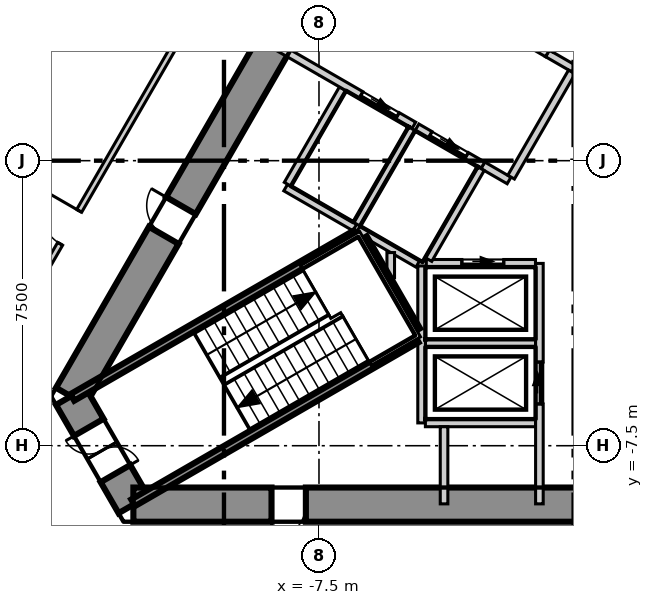
"""IFC4 building model, lengths in metres.
Left out: names, types, materials, properties, quantities, classifications, styles, units other than length and angle.
Written with IfcOpenShell. Run it as: python <this file> out.ifc"""

import sys

from ifc_helpers import new_model, si_unit, direction, frame, frame_2d, origin, place, context, subcontext, project, spatial, polyline, rectangle, outline, extrude, element, fill, save


model = new_model("IFC4")
c1 = context("Model", 3, precision=1e-05, world=origin(), true_north=direction((0.0, 1.0)))
c2 = subcontext(c1, "Body", "Model", "MODEL_VIEW")
j1 = project(units=[si_unit("LENGTHUNIT", "METRE"), si_unit("PLANEANGLEUNIT", "RADIAN")], contexts=[c1])
p1 = place(None, origin())
s1 = spatial("IfcSite", under=j1, at=p1, CompositionType="ELEMENT")
p2 = place(p1, origin())
s2 = spatial("IfcBuilding", under=s1, at=p2, CompositionType="ELEMENT")
p3 = place(p2, frame((0.0, 0.0, 59.3)))
s3 = spatial("IfcBuildingStorey", under=s2, at=p3, CompositionType="ELEMENT", Elevation=59.3)
p4 = place(p3, frame((-1.645, 15.25, -0.3), z_axis=(0.0, 0.0, 1.0), x_axis=(-0.500026485275, -0.866010111964, 0.0)))
e1 = element("IfcWall", 1, at=p4, inside=s3, PredefinedType="SHEAR", context=c2, shape_type="SweptSolid", body=[
    extrude(outline(polyline([(-0.26, -0.45), (1.685, -0.45), (3.63, -0.45), (5.576, -0.45), (7.521, -0.45), (9.466, -0.449), (11.411, -0.449), (13.357, -0.449), (15.302, -0.449), (17.247, -0.449), (19.192, -0.449), (21.138, -0.449), (23.083, -0.449), (25.028, -0.449), (24.509, 0.45), (22.644, 0.45), (20.778, 0.45), (18.913, 0.45), (17.048, 0.45), (15.182, 0.449), (13.317, 0.449), (11.452, 0.449), (9.587, 0.449), (7.721, 0.449), (5.856, 0.449), (3.991, 0.449), (2.125, 0.449), (0.26, 0.449), (-0.26, -0.45)])), origin(), (0.0, 0.0, 1.0), 4.0),
])
p5 = place(p4, frame((11.834, 0.0, 0.3)))
e2 = element("IfcOpeningElement", 2, at=p5, cuts=e1, PredefinedType="OPENING", context=c2, shape_type="SweptSolid", body=[
    extrude(rectangle(XDim=1.1, YDim=2.1, at=frame_2d((0.55, 1.05))), frame((0.0, 0.46, 0.0), z_axis=(0.0, -1.0, 0.0), x_axis=(1.0, 0.0, 0.0)), (0.0, 0.0, 1.0), 0.92),
])
p6 = place(p4, frame((18.976, 0.0, 0.3)))
e3 = element("IfcOpeningElement", 3, at=p6, cuts=e1, PredefinedType="OPENING", context=c2, shape_type="SweptSolid", body=[
    extrude(rectangle(XDim=0.9, YDim=2.1, at=frame_2d((0.45, 1.05))), frame((0.0, 0.46, 0.0), z_axis=(0.0, -1.0, 0.0), x_axis=(1.0, 0.0, 0.0)), (0.0, 0.0, 1.0), 0.92),
])
p7 = place(p4, frame((4.892, 0.0, 0.3)))
e4 = element("IfcOpeningElement", 4, at=p7, cuts=e1, PredefinedType="OPENING", context=c2, shape_type="SweptSolid", body=[
    extrude(rectangle(XDim=0.9, YDim=2.1, at=frame_2d((0.45, 1.05))), frame((0.0, 0.46, 0.0), z_axis=(0.0, -1.0, 0.0), x_axis=(1.0, 0.0, 0.0)), (0.0, 0.0, 1.0), 0.92),
])
p8 = place(p3, frame((-14.03, -6.2, -0.3), z_axis=(0.0, 0.0, 1.0), x_axis=(0.500111984565, -0.865960739811, 0.0)))
e5 = element("IfcWall", 5, at=p8, inside=s3, PredefinedType="SHEAR", context=c2, shape_type="SweptSolid", body=[
    extrude(outline(polyline([(-0.26, -0.449), (1.646, -0.449), (3.551, -0.45), (3.032, 0.45), (1.646, 0.45), (0.26, 0.45), (-0.26, -0.449)])), origin(), (0.0, 0.0, 1.0), 4.0),
])
p9 = place(p8, frame((0.946, 0.0, 0.3)))
e6 = element("IfcOpeningElement", 6, at=p9, cuts=e5, PredefinedType="OPENING", context=c2, shape_type="SweptSolid", body=[
    extrude(rectangle(XDim=1.4, YDim=2.1, at=frame_2d((0.7, 1.05))), frame((0.0, 0.46, 0.0), z_axis=(0.0, -1.0, 0.0), x_axis=(1.0, 0.0, 0.0)), (0.0, 0.0, 1.0), 0.92),
])
p10 = place(p3, frame((-12.384, -9.05, -0.3), z_axis=(0.0, 0.0, 1.0), x_axis=(1.0, 0.0, 0.0)))
e7 = element("IfcWall", 7, at=p10, inside=s3, PredefinedType="SHEAR", context=c2, shape_type="SweptSolid", body=[
    extrude(outline(polyline([(-0.26, -0.45), (1.685, -0.45), (3.63, -0.45), (5.576, -0.45), (7.521, -0.45), (9.466, -0.45), (11.411, -0.45), (13.357, -0.45), (15.302, -0.45), (17.247, -0.45), (19.192, -0.45), (21.138, -0.45), (23.083, -0.45), (25.028, -0.45), (24.508, 0.45), (22.643, 0.45), (20.778, 0.45), (18.912, 0.45), (17.047, 0.45), (15.182, 0.45), (13.317, 0.45), (11.451, 0.45), (9.586, 0.45), (7.721, 0.45), (5.856, 0.45), (3.99, 0.45), (2.125, 0.45), (0.26, 0.45), (-0.26, -0.45)])), origin(), (0.0, 0.0, 1.0), 4.0),
])
p11 = place(p10, frame((3.637, 0.0, 0.3)))
e8 = element("IfcOpeningElement", 8, at=p11, cuts=e7, PredefinedType="OPENING", context=c2, shape_type="SweptSolid", body=[
    extrude(rectangle(XDim=0.9, YDim=2.1, at=frame_2d((0.45, 1.05))), frame((0.0, 0.46, 0.0), z_axis=(0.0, -1.0, 0.0), x_axis=(1.0, 0.0, 0.0)), (0.0, 0.0, 1.0), 0.92),
])
p12 = place(p10, frame((16.022, 0.0, 0.3)))
e9 = element("IfcOpeningElement", 9, at=p12, cuts=e7, PredefinedType="OPENING", context=c2, shape_type="SweptSolid", body=[
    extrude(rectangle(XDim=0.9, YDim=2.1, at=frame_2d((0.45, 1.05))), frame((0.0, 0.46, 0.0), z_axis=(0.0, -1.0, 0.0), x_axis=(1.0, 0.0, 0.0)), (0.0, 0.0, 1.0), 0.92),
])
p13 = place(p3, frame((-3.371, 37.591, 0.0), z_axis=(0.0, 0.0, 1.0), x_axis=(-0.500006313899, -0.866021758423, 0.0)))
e10 = element("IfcWall", 10, at=p13, inside=s3, PredefinedType="ELEMENTEDWALL", context=c2, shape_type="SweptSolid", body=[
    extrude(rectangle(XDim=61.719, YDim=0.2, at=frame_2d((30.859, 0.0))), origin(), (0.0, 0.0, 1.0), 3.7),
])
p14 = place(p13, frame((2.198, 0.0, 0.9)))
e11 = element("IfcOpeningElement", 11, at=p14, cuts=e10, PredefinedType="OPENING", context=c2, shape_type="SweptSolid", body=[
    extrude(rectangle(XDim=5.6, YDim=2.5, at=frame_2d((2.8, 1.25))), frame((0.0, 0.11, 0.0), z_axis=(0.0, -1.0, 0.0), x_axis=(1.0, 0.0, 0.0)), (0.0, 0.0, 1.0), 0.22),
])
p15 = place(p13, frame((9.59, 0.0, 0.9)))
e12 = element("IfcOpeningElement", 12, at=p15, cuts=e10, PredefinedType="OPENING", context=c2, shape_type="SweptSolid", body=[
    extrude(rectangle(XDim=5.6, YDim=2.5, at=frame_2d((2.8, 1.25))), frame((0.0, 0.11, 0.0), z_axis=(0.0, -1.0, 0.0), x_axis=(1.0, 0.0, 0.0)), (0.0, 0.0, 1.0), 0.22),
])
p16 = place(p13, frame((16.982, 0.0, 0.9)))
e13 = element("IfcOpeningElement", 13, at=p16, cuts=e10, PredefinedType="OPENING", context=c2, shape_type="SweptSolid", body=[
    extrude(rectangle(XDim=5.6, YDim=2.5, at=frame_2d((2.8, 1.25))), frame((0.0, 0.11, 0.0), z_axis=(0.0, -1.0, 0.0), x_axis=(1.0, 0.0, 0.0)), (0.0, 0.0, 1.0), 0.22),
])
p17 = place(p13, frame((24.373, 0.0, 0.9)))
e14 = element("IfcOpeningElement", 14, at=p17, cuts=e10, PredefinedType="OPENING", context=c2, shape_type="SweptSolid", body=[
    extrude(rectangle(XDim=5.6, YDim=2.5, at=frame_2d((2.8, 1.25))), frame((0.0, 0.11, 0.0), z_axis=(0.0, -1.0, 0.0), x_axis=(1.0, 0.0, 0.0)), (0.0, 0.0, 1.0), 0.22),
])
p18 = place(p13, frame((31.765, 0.0, 0.9)))
e15 = element("IfcOpeningElement", 15, at=p18, cuts=e10, PredefinedType="OPENING", context=c2, shape_type="SweptSolid", body=[
    extrude(rectangle(XDim=5.6, YDim=2.5, at=frame_2d((2.8, 1.25))), frame((0.0, 0.11, 0.0), z_axis=(0.0, -1.0, 0.0), x_axis=(1.0, 0.0, 0.0)), (0.0, 0.0, 1.0), 0.22),
])
p19 = place(p13, frame((39.157, 0.0, 0.9)))
e16 = element("IfcOpeningElement", 16, at=p19, cuts=e10, PredefinedType="OPENING", context=c2, shape_type="SweptSolid", body=[
    extrude(rectangle(XDim=5.6, YDim=2.5, at=frame_2d((2.8, 1.25))), frame((0.0, 0.11, 0.0), z_axis=(0.0, -1.0, 0.0), x_axis=(1.0, 0.0, 0.0)), (0.0, 0.0, 1.0), 0.22),
])
p20 = place(p13, frame((46.548, 0.0, 0.9)))
e17 = element("IfcOpeningElement", 17, at=p20, cuts=e10, PredefinedType="OPENING", context=c2, shape_type="SweptSolid", body=[
    extrude(rectangle(XDim=5.6, YDim=2.5, at=frame_2d((2.8, 1.25))), frame((0.0, 0.11, 0.0), z_axis=(0.0, -1.0, 0.0), x_axis=(1.0, 0.0, 0.0)), (0.0, 0.0, 1.0), 0.22),
])
p21 = place(p13, frame((53.94, 0.0, 0.9)))
e18 = element("IfcOpeningElement", 18, at=p21, cuts=e10, PredefinedType="OPENING", context=c2, shape_type="SweptSolid", body=[
    extrude(rectangle(XDim=5.6, YDim=2.5, at=frame_2d((2.8, 1.25))), frame((0.0, 0.11, 0.0), z_axis=(0.0, -1.0, 0.0), x_axis=(1.0, 0.0, 0.0)), (0.0, 0.0, 1.0), 0.22),
])
p22 = place(p3, frame((-19.497, -11.17, 0.0), z_axis=(0.0, 0.0, 1.0), x_axis=(0.499998854553, 0.866026065108, 0.0)))
e19 = element("IfcWall", 19, at=p22, inside=s3, PredefinedType="PARTITIONING", context=c2, shape_type="SweptSolid", body=[
    extrude(rectangle(XDim=38.994, YDim=0.15, at=frame_2d((19.497, 0.0))), origin(), (0.0, 0.0, 1.0), 3.7),
])
p23 = place(p22, frame((36.044, 0.0, 0.0)))
e20 = element("IfcOpeningElement", 20, at=p23, cuts=e19, PredefinedType="OPENING", context=c2, shape_type="SweptSolid", body=[
    extrude(rectangle(XDim=1.1, YDim=2.1, at=frame_2d((0.55, 1.05))), frame((0.0, 0.085, 0.0), z_axis=(0.0, -1.0, 0.0), x_axis=(1.0, 0.0, 0.0)), (0.0, 0.0, 1.0), 0.17),
])
p24 = place(p22, frame((21.855, 0.0, 0.0)))
e21 = element("IfcOpeningElement", 21, at=p24, cuts=e19, PredefinedType="OPENING", context=c2, shape_type="SweptSolid", body=[
    extrude(rectangle(XDim=1.1, YDim=2.1, at=frame_2d((0.55, 1.05))), frame((0.0, 0.085, 0.0), z_axis=(0.0, -1.0, 0.0), x_axis=(1.0, 0.0, 0.0)), (0.0, 0.0, 1.0), 0.17),
])
p25 = place(p22, frame((32.155, 0.0, 0.0)))
e22 = element("IfcOpeningElement", 22, at=p25, cuts=e19, PredefinedType="OPENING", context=c2, shape_type="SweptSolid", body=[
    extrude(rectangle(XDim=0.9, YDim=2.1, at=frame_2d((0.45, 1.05))), frame((0.0, 0.085, 0.0), z_axis=(0.0, -1.0, 0.0), x_axis=(1.0, 0.0, 0.0)), (0.0, 0.0, 1.0), 0.17),
])
p26 = place(p22, frame((28.955, 0.0, 0.0)))
e23 = element("IfcOpeningElement", 23, at=p26, cuts=e19, PredefinedType="OPENING", context=c2, shape_type="SweptSolid", body=[
    extrude(rectangle(XDim=0.9, YDim=2.1, at=frame_2d((0.45, 1.05))), frame((0.0, 0.085, 0.0), z_axis=(0.0, -1.0, 0.0), x_axis=(1.0, 0.0, 0.0)), (0.0, 0.0, 1.0), 0.17),
])
p27 = place(p22, frame((26.055, 0.0, 0.0)))
e24 = element("IfcOpeningElement", 24, at=p27, cuts=e19, PredefinedType="OPENING", context=c2, shape_type="SweptSolid", body=[
    extrude(rectangle(XDim=1.0, YDim=2.1, at=frame_2d((0.5, 1.05))), frame((0.0, 0.085, 0.0), z_axis=(0.0, -1.0, 0.0), x_axis=(1.0, 0.0, 0.0)), (0.0, 0.0, 1.0), 0.17),
])
p28 = place(p22, frame((10.373, 0.0, 0.0)))
e25 = element("IfcOpeningElement", 25, at=p28, cuts=e19, PredefinedType="OPENING", context=c2, shape_type="SweptSolid", body=[
    extrude(rectangle(XDim=1.0, YDim=2.1, at=frame_2d((0.5, 1.05))), frame((0.0, 0.085, 0.0), z_axis=(0.0, -1.0, 0.0), x_axis=(1.0, 0.0, 0.0)), (0.0, 0.0, 1.0), 0.17),
])
p29 = place(p22, frame((17.773, 0.0, 0.0)))
e26 = element("IfcOpeningElement", 26, at=p29, cuts=e19, PredefinedType="OPENING", context=c2, shape_type="SweptSolid", body=[
    extrude(rectangle(XDim=0.9, YDim=2.1, at=frame_2d((0.45, 1.05))), frame((0.0, 0.085, 0.0), z_axis=(0.0, -1.0, 0.0), x_axis=(1.0, 0.0, 0.0)), (0.0, 0.0, 1.0), 0.17),
])
p30 = place(p22, frame((1.689, 0.0, 0.0)))
e27 = element("IfcOpeningElement", 27, at=p30, cuts=e19, PredefinedType="OPENING", context=c2, shape_type="SweptSolid", body=[
    extrude(rectangle(XDim=1.1, YDim=2.1, at=frame_2d((0.55, 1.05))), frame((0.0, 0.085, 0.0), z_axis=(0.0, -1.0, 0.0), x_axis=(1.0, 0.0, 0.0)), (0.0, 0.0, 1.0), 0.17),
])
p31 = place(p3, frame((-8.376, -0.707, 0.0), z_axis=(0.0, 0.0, 1.0), x_axis=(0.866067520717, -0.499927044236, 0.0)))
e28 = element("IfcWall", 28, at=p31, inside=s3, PredefinedType="SOLIDWALL", context=c2, shape_type="SweptSolid", body=[
    extrude(rectangle(XDim=2.1, YDim=0.2, at=frame_2d((1.05, 0.0))), origin(), (0.0, 0.0, 1.0), 3.7),
])
p32 = place(p3, frame((-8.326, -0.62, 0.0), z_axis=(0.0, 0.0, 1.0), x_axis=(0.500023687443, 0.866011727401, 0.0)))
e29 = element("IfcWall", 29, at=p32, inside=s3, PredefinedType="SOLIDWALL", context=c2, shape_type="SweptSolid", body=[
    extrude(rectangle(XDim=2.9, YDim=0.2, at=frame_2d((1.45, 0.0))), origin(), (0.0, 0.0, 1.0), 3.7),
])
p33 = place(p3, frame((-4.7, -4.8, 0.0), z_axis=(0.0, 0.0, 1.0), x_axis=(1.0, 0.0, 0.0)))
e30 = element("IfcWall", 30, at=p33, inside=s3, PredefinedType="SOLIDWALL", context=c2, shape_type="SweptSolid", body=[
    extrude(rectangle(XDim=2.9, YDim=0.2, at=frame_2d((1.45, 0.0))), origin(), (0.0, 0.0, 1.0), 3.7),
])
p34 = place(p3, frame((-4.8, -6.9, 0.0), z_axis=(0.0, 0.0, 1.0), x_axis=(0.0, 1.0, 0.0)))
e31 = element("IfcWall", 31, at=p34, inside=s3, PredefinedType="SOLIDWALL", context=c2, shape_type="SweptSolid", body=[
    extrude(rectangle(XDim=4.131, YDim=0.2, at=frame_2d((2.065, 0.0))), origin(), (0.0, 0.0, 1.0), 3.7),
])
p35 = place(p3, frame((-4.7, -6.9, 0.0), z_axis=(0.0, 0.0, 1.0), x_axis=(1.0, 0.0, 0.0)))
e32 = element("IfcWall", 32, at=p35, inside=s3, PredefinedType="SOLIDWALL", context=c2, shape_type="SweptSolid", body=[
    extrude(rectangle(XDim=2.9, YDim=0.2, at=frame_2d((1.45, 0.0))), origin(), (0.0, 0.0, 1.0), 3.7),
])
p36 = place(p3, frame((-1.7, -9.03, 0.0), z_axis=(0.0, 0.0, 1.0), x_axis=(0.0, 1.0, 0.0)))
e33 = element("IfcWall", 33, at=p36, inside=s3, PredefinedType="SOLIDWALL", context=c2, shape_type="SweptSolid", body=[
    extrude(rectangle(XDim=6.327, YDim=0.2, at=frame_2d((3.164, 0.0))), origin(), (0.0, 0.0, 1.0), 3.7),
])
p37 = place(p36, frame((2.63, 0.0, 0.0)))
e34 = element("IfcOpeningElement", 34, at=p37, cuts=e33, PredefinedType="OPENING", context=c2, shape_type="SweptSolid", body=[
    extrude(rectangle(XDim=1.1, YDim=2.1, at=frame_2d((0.55, 1.05))), frame((0.0, 0.11, 0.0), z_axis=(0.0, -1.0, 0.0), x_axis=(1.0, 0.0, 0.0)), (0.0, 0.0, 1.0), 0.22),
])
p38 = place(p3, frame((-4.676, -2.7, 0.0), z_axis=(0.0, 0.0, 1.0), x_axis=(1.0, 0.0, 0.0)))
e35 = element("IfcWall", 35, at=p38, inside=s3, PredefinedType="SOLIDWALL", context=c2, shape_type="SweptSolid", body=[
    extrude(rectangle(XDim=2.873, YDim=0.2, at=frame_2d((1.437, 0.0))), origin(), (0.0, 0.0, 1.0), 3.7),
])
p39 = place(p38, frame((0.937, 0.0, 0.0)))
e36 = element("IfcOpeningElement", 36, at=p39, cuts=e35, PredefinedType="OPENING", context=c2, shape_type="SweptSolid", body=[
    extrude(rectangle(XDim=1.1, YDim=2.1, at=frame_2d((0.55, 1.05))), frame((0.0, 0.11, 0.0), z_axis=(0.0, -1.0, 0.0), x_axis=(1.0, 0.0, 0.0)), (0.0, 0.0, 1.0), 0.22),
])
p40 = place(p3, frame((-8.67, 3.043, 0.0), z_axis=(0.0, 0.0, 1.0), x_axis=(0.866029956157, -0.499992114976, 0.0)))
e37 = element("IfcWall", 37, at=p40, inside=s3, PredefinedType="SOLIDWALL", context=c2, shape_type="SweptSolid", body=[
    extrude(rectangle(XDim=4.232, YDim=0.2, at=frame_2d((2.116, 0.0))), origin(), (0.0, 0.0, 1.0), 3.7),
])
p41 = place(p40, frame((2.63, 0.0, 0.0)))
e38 = element("IfcOpeningElement", 38, at=p41, cuts=e37, PredefinedType="OPENING", context=c2, shape_type="SweptSolid", body=[
    extrude(rectangle(XDim=1.1, YDim=2.1, at=frame_2d((0.55, 1.05))), frame((0.0, 0.11, 0.0), z_axis=(0.0, -1.0, 0.0), x_axis=(1.0, 0.0, 0.0)), (0.0, 0.0, 1.0), 0.22),
])
p42 = place(p3, frame((-3.188, -0.122, 0.0), z_axis=(0.0, 0.0, 1.0), x_axis=(0.865705793592, -0.50055317294, 0.0)))
e39 = element("IfcWall", 39, at=p42, inside=s3, PredefinedType="SOLIDWALL", context=c2, shape_type="SweptSolid", body=[
    extrude(rectangle(XDim=0.797, YDim=0.2, at=frame_2d((0.398, 0.0))), origin(), (0.0, 0.0, 1.0), 3.7),
])
p43 = place(p3, frame((-1.488, 2.822, 0.0), z_axis=(0.0, 0.0, 1.0), x_axis=(0.866236612152, -0.499633997809, 0.0)))
e40 = element("IfcWall", 40, at=p43, inside=s3, PredefinedType="SOLIDWALL", context=c2, shape_type="SweptSolid", body=[
    extrude(rectangle(XDim=0.796, YDim=0.2, at=frame_2d((0.398, 0.0))), origin(), (0.0, 0.0, 1.0), 3.7),
])
p44 = place(p3, frame((-2.444, -0.433, 0.0), z_axis=(0.0, 0.0, 1.0), x_axis=(0.500035624827, 0.866004834804, 0.0)))
e41 = element("IfcWall", 41, at=p44, inside=s3, PredefinedType="SOLIDWALL", context=c2, shape_type="SweptSolid", body=[
    extrude(rectangle(XDim=3.194, YDim=0.2, at=frame_2d((1.597, 0.0))), origin(), (0.0, 0.0, 1.0), 3.7),
])
p45 = place(p3, frame((-6.507, -1.67, 0.0), z_axis=(0.0, 0.0, 1.0), x_axis=(0.50012328804, 0.865954211699, 0.0)))
e42 = element("IfcWall", 42, at=p45, inside=s3, PredefinedType="SOLIDWALL", context=c2, shape_type="SweptSolid", body=[
    extrude(rectangle(XDim=2.9, YDim=0.2, at=frame_2d((1.45, 0.0))), origin(), (0.0, 0.0, 1.0), 3.7),
])
p46 = place(p3, frame((-6.47, -1.807, 0.0), z_axis=(0.0, 0.0, 1.0), x_axis=(0.865883195159, -0.500246231712, 0.0)))
e43 = element("IfcWall", 43, at=p46, inside=s3, PredefinedType="SOLIDWALL", context=c2, shape_type="SweptSolid", body=[
    extrude(rectangle(XDim=1.815, YDim=0.2, at=frame_2d((0.908, 0.0))), origin(), (0.0, 0.0, 1.0), 3.7),
])
p47 = place(p3, frame((-4.922, 0.879, 0.0), z_axis=(0.0, 0.0, 1.0), x_axis=(0.866073918653, -0.499915960366, 0.0)))
e44 = element("IfcWall", 44, at=p47, inside=s3, PredefinedType="SOLIDWALL", context=c2, shape_type="SweptSolid", body=[
    extrude(rectangle(XDim=2.002, YDim=0.2, at=frame_2d((1.001, 0.0))), origin(), (0.0, 0.0, 1.0), 3.7),
])
p48 = place(p47, frame((0.402, 0.0, 0.0)))
e45 = element("IfcOpeningElement", 45, at=p48, cuts=e44, PredefinedType="OPENING", context=c2, shape_type="SweptSolid", body=[
    extrude(rectangle(XDim=1.1, YDim=2.1, at=frame_2d((0.55, 1.05))), frame((0.0, 0.11, 0.0), z_axis=(0.0, -1.0, 0.0), x_axis=(1.0, 0.0, 0.0)), (0.0, 0.0, 1.0), 0.22),
])
p49 = place(p3, frame((-4.619, -2.6, 0.0), z_axis=(0.0, 0.0, 1.0), x_axis=(0.50009492287, 0.865970593103, 0.0)))
e46 = element("IfcWall", 46, at=p49, inside=s3, PredefinedType="SOLIDWALL", context=c2, shape_type="SweptSolid", body=[
    extrude(rectangle(XDim=2.761, YDim=0.2, at=frame_2d((1.381, 0.0))), origin(), (0.0, 0.0, 1.0), 3.7),
])
p50 = place(p3, frame((-3.309, 3.873, 0.0), z_axis=(0.0, 0.0, 1.0), x_axis=(0.866098583652, -0.499873227325, 0.0)))
e47 = element("IfcWall", 47, at=p50, inside=s3, PredefinedType="SOLIDWALL", context=c2, shape_type="SweptSolid", body=[
    extrude(rectangle(XDim=2.103, YDim=0.2, at=frame_2d((1.051, 0.0))), origin(), (0.0, 0.0, 1.0), 3.7),
])
p51 = place(p50, frame((0.502, 0.0, 0.0)))
e48 = element("IfcOpeningElement", 48, at=p51, cuts=e47, PredefinedType="OPENING", context=c2, shape_type="SweptSolid", body=[
    extrude(rectangle(XDim=1.1, YDim=2.1, at=frame_2d((0.55, 1.05))), frame((0.0, 0.11, 0.0), z_axis=(0.0, -1.0, 0.0), x_axis=(1.0, 0.0, 0.0)), (0.0, 0.0, 1.0), 0.22),
])
p52 = place(p3, frame((-5.612, -3.08, 0.0), z_axis=(0.0, 0.0, 1.0), x_axis=(0.0, 1.0, 0.0)))
e49 = element("IfcWall", 49, at=p52, inside=s3, PredefinedType="SOLIDWALL", context=c2, shape_type="SweptSolid", body=[
    extrude(rectangle(XDim=0.662, YDim=0.2, at=frame_2d((0.331, 0.0))), origin(), (0.0, 0.0, 1.0), 3.7),
])
p53 = place(p3, frame((-4.209, -9.03, 0.0), z_axis=(0.0, 0.0, 1.0), x_axis=(0.0, 1.0, 0.0)))
e50 = element("IfcWall", 50, at=p53, inside=s3, PredefinedType="SOLIDWALL", context=c2, shape_type="SweptSolid", body=[
    extrude(rectangle(XDim=2.03, YDim=0.2, at=frame_2d((1.015, 0.0))), origin(), (0.0, 0.0, 1.0), 3.7),
])
p54 = place(p3, frame((-13.99, -6.229, 0.0), z_axis=(0.0, 0.0, 1.0), x_axis=(0.866060059011, 0.499939970583, 0.0)))
e51 = element("IfcWall", 51, at=p54, inside=s3, PredefinedType="SOLIDWALL", context=c2, shape_type="SweptSolid", body=[
    extrude(rectangle(XDim=8.615, YDim=0.2, at=frame_2d((4.307, 0.0))), origin(), (0.0, 0.0, 1.0), 3.7),
])
p55 = place(p3, frame((-6.329, -2.038, 0.0), z_axis=(0.0, 0.0, 1.0), x_axis=(0.500200581029, -0.865909567298, 0.0)))
e52 = element("IfcWall", 52, at=p55, inside=s3, PredefinedType="SOLIDWALL", context=c2, shape_type="SweptSolid", body=[
    extrude(rectangle(XDim=2.799, YDim=0.2, at=frame_2d((1.399, 0.0))), origin(), (0.0, 0.0, 1.0), 3.7),
])
p56 = place(p3, frame((-12.39, -9.001, 0.0), z_axis=(0.0, 0.0, 1.0), x_axis=(0.866010975815, 0.500024989144, 0.0)))
e53 = element("IfcWall", 53, at=p56, inside=s3, PredefinedType="SOLIDWALL", context=c2, shape_type="SweptSolid", body=[
    extrude(rectangle(XDim=8.615, YDim=0.2, at=frame_2d((4.308, 0.0))), origin(), (0.0, 0.0, 1.0), 3.7),
])
p57 = place(p39, origin())
e54 = element("IfcDoor", 54, at=p57, inside=s3, OperationType="SLIDING_TO_LEFT", PredefinedType="DOOR", context=c2, shape_type="SweptSolid", body=[
    extrude(rectangle(XDim=1.1, YDim=2.1, at=frame_2d((0.55, 1.05))), frame((0.0, 0.025, 0.0), z_axis=(0.0, -1.0, 0.0), x_axis=(1.0, 0.0, 0.0)), (0.0, 0.0, 1.0), 0.05),
])
fill(e36, e54)
p58 = place(p37, origin())
e55 = element("IfcDoor", 55, at=p58, inside=s3, OperationType="SLIDING_TO_LEFT", PredefinedType="DOOR", context=c2, shape_type="SweptSolid", body=[
    extrude(rectangle(XDim=1.1, YDim=2.1, at=frame_2d((0.55, 1.05))), frame((0.0, 0.025, 0.0), z_axis=(0.0, -1.0, 0.0), x_axis=(1.0, 0.0, 0.0)), (0.0, 0.0, 1.0), 0.05),
])
fill(e34, e55)
p59 = place(p48, origin())
e56 = element("IfcDoor", 56, at=p59, inside=s3, OperationType="SLIDING_TO_LEFT", PredefinedType="DOOR", context=c2, shape_type="SweptSolid", body=[
    extrude(rectangle(XDim=1.1, YDim=2.1, at=frame_2d((0.55, 1.05))), frame((0.0, 0.025, 0.0), z_axis=(0.0, -1.0, 0.0), x_axis=(1.0, 0.0, 0.0)), (0.0, 0.0, 1.0), 0.05),
])
fill(e45, e56)
p60 = place(p41, origin())
e57 = element("IfcDoor", 57, at=p60, inside=s3, OperationType="SLIDING_TO_LEFT", PredefinedType="DOOR", context=c2, shape_type="SweptSolid", body=[
    extrude(rectangle(XDim=1.1, YDim=2.1, at=frame_2d((0.55, 1.05))), frame((0.0, 0.025, 0.0), z_axis=(0.0, -1.0, 0.0), x_axis=(1.0, 0.0, 0.0)), (0.0, 0.0, 1.0), 0.05),
])
fill(e38, e57)
p61 = place(p28, origin())
e58 = element("IfcDoor", 58, at=p61, inside=s3, OperationType="SINGLE_SWING_LEFT", PredefinedType="DOOR", context=c2, shape_type="SweptSolid", body=[
    extrude(rectangle(XDim=1.0, YDim=2.1, at=frame_2d((0.5, 1.05))), frame((0.0, 0.025, 0.0), z_axis=(0.0, -1.0, 0.0), x_axis=(1.0, 0.0, 0.0)), (0.0, 0.0, 1.0), 0.05),
])
fill(e25, e58)
p62 = place(p9, origin())
e59 = element("IfcDoor", 59, at=p62, inside=s3, OperationType="DOUBLE_DOOR_SINGLE_SWING", PredefinedType="DOOR", context=c2, shape_type="SweptSolid", body=[
    extrude(rectangle(XDim=1.4, YDim=2.1, at=frame_2d((0.7, 1.05))), frame((0.0, 0.025, 0.0), z_axis=(0.0, -1.0, 0.0), x_axis=(1.0, 0.0, 0.0)), (0.0, 0.0, 1.0), 0.05),
])
fill(e6, e59)
p63 = place(p6, origin())
e60 = element("IfcDoor", 60, at=p63, inside=s3, OperationType="SINGLE_SWING_LEFT", PredefinedType="DOOR", context=c2, shape_type="SweptSolid", body=[
    extrude(rectangle(XDim=0.9, YDim=2.1, at=frame_2d((0.45, 1.05))), frame((0.0, 0.025, 0.0), z_axis=(0.0, -1.0, 0.0), x_axis=(1.0, 0.0, 0.0)), (0.0, 0.0, 1.0), 0.05),
])
fill(e3, e60)
p64 = place(p11, origin())
e61 = element("IfcDoor", 61, at=p64, inside=s3, OperationType="SINGLE_SWING_LEFT", PredefinedType="DOOR", context=c2, shape_type="SweptSolid", body=[
    extrude(rectangle(XDim=0.9, YDim=2.1, at=frame_2d((0.45, 1.05))), frame((0.0, 0.025, 0.0), z_axis=(0.0, -1.0, 0.0), x_axis=(1.0, 0.0, 0.0)), (0.0, 0.0, 1.0), 0.05),
])
fill(e8, e61)
save(model, sys.argv[1])
